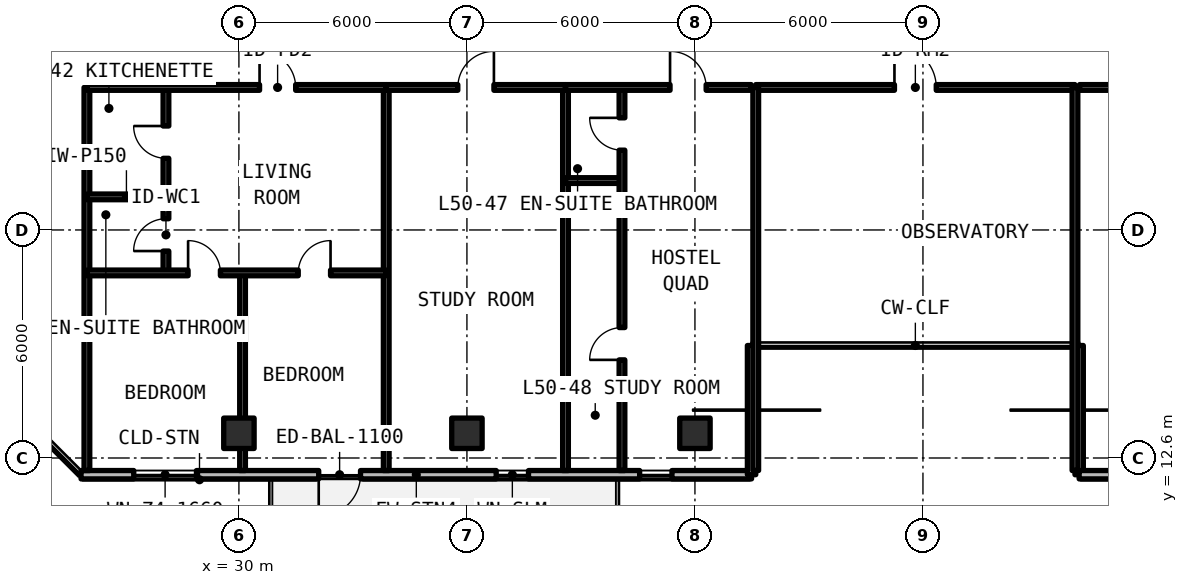
"""IFC4 building model, lengths in metres.
Left out: names, types, materials, properties, quantities, classifications, styles, units other than length and angle.
Written with IfcOpenShell. Run it as: python <this file> out.ifc"""

import sys

from ifc_helpers import new_model, si_unit, direction, frame, frame_2d, origin, origin_2d, place, context, subcontext, project, spatial, rectangle, extrude, element, fill, save


model = new_model("IFC4")
c1 = context("Model", 3, precision=1e-05, world=origin(), true_north=direction((0.0, 1.0)))
c2 = subcontext(c1, "Body", "Model", "MODEL_VIEW")
j1 = project(units=[si_unit("LENGTHUNIT", "METRE"), si_unit("PLANEANGLEUNIT", "RADIAN")], contexts=[c1])
p1 = place(None, origin())
s1 = spatial("IfcSite", under=j1, at=p1, CompositionType="ELEMENT")
p2 = place(p1, origin())
s2 = spatial("IfcBuilding", under=s1, at=p2, CompositionType="ELEMENT")
p3 = place(p2, frame((0.0, 0.0, 181.83)))
s3 = spatial("IfcBuildingStorey", under=s2, at=p3, CompositionType="ELEMENT", Elevation=181.83)
for number, where, z_axis, x_axis in (
    (1, (30.0, 13.25, 0.0), (0.0, 0.0, 1.0), (1.0, 0.0, 0.0)),
    (2, (36.0, 13.25, 0.0), (0.0, 0.0, 1.0), (1.0, 0.0, 0.0)),
    (3, (42.0, 13.25, 0.0), (0.0, 0.0, 1.0), (1.0, 0.0, 0.0)),
):
    element("IfcColumn", number, at=place(p3, frame(where, z_axis=z_axis, x_axis=x_axis)), inside=s3, PredefinedType="COLUMN", context=c2, shape_type="SweptSolid", body=[
        extrude(rectangle(XDim=0.8, YDim=0.8, at=origin_2d()), origin(), (0.0, 0.0, 1.0), 3.3),
    ])
p4 = place(p3, frame((25.846, 12.16, 0.0), z_axis=(0.0, 0.0, 1.0), x_axis=(1.0, 0.0, 0.0)))
e4 = element("IfcWall", 4, at=p4, inside=s3, PredefinedType="SOLIDWALL", context=c2, shape_type="SweptSolid", body=[
    extrude(rectangle(XDim=17.644, YDim=0.22, at=frame_2d((8.822, 0.0))), origin(), (0.0, 0.0, 1.0), 3.08),
])
p5 = place(p4, frame((6.254, 0.0, 0.0)))
e5 = element("IfcOpeningElement", 5, at=p5, cuts=e4, PredefinedType="OPENING", context=c2, shape_type="SweptSolid", body=[
    extrude(rectangle(XDim=1.1, YDim=2.15, at=frame_2d((0.55, 1.075))), frame((0.0, 0.12, 0.0), z_axis=(0.0, -1.0, 0.0), x_axis=(1.0, 0.0, 0.0)), (0.0, 0.0, 1.0), 0.24),
])
p6 = place(p4, frame((1.387, 0.0, 0.78)))
e6 = element("IfcOpeningElement", 6, at=p6, cuts=e4, PredefinedType="OPENING", context=c2, shape_type="SweptSolid", body=[
    extrude(rectangle(XDim=1.65, YDim=1.66, at=frame_2d((0.825, 0.83))), frame((0.0, 0.12, 0.0), z_axis=(0.0, -1.0, 0.0), x_axis=(1.0, 0.0, 0.0)), (0.0, 0.0, 1.0), 0.24),
])
p7 = place(p4, frame((10.925, 0.0, 0.78)))
e7 = element("IfcOpeningElement", 7, at=p7, cuts=e4, PredefinedType="OPENING", context=c2, shape_type="SweptSolid", body=[
    extrude(rectangle(XDim=0.85, YDim=1.65, at=frame_2d((0.425, 0.825))), frame((0.0, 0.12, 0.0), z_axis=(0.0, -1.0, 0.0), x_axis=(1.0, 0.0, 0.0)), (0.0, 0.0, 1.0), 0.24),
])
p8 = place(p4, frame((14.699, 0.0, 0.78)))
e8 = element("IfcOpeningElement", 8, at=p8, cuts=e4, PredefinedType="OPENING", context=c2, shape_type="SweptSolid", body=[
    extrude(rectangle(XDim=0.85, YDim=1.65, at=frame_2d((0.425, 0.825))), frame((0.0, 0.12, 0.0), z_axis=(0.0, -1.0, 0.0), x_axis=(1.0, 0.0, 0.0)), (0.0, 0.0, 1.0), 0.24),
])
for number, where, z_axis, x_axis in (
    (9, (43.49, 12.16, 0.0), (0.0, 0.0, 1.0), (0.0, 1.0, 0.0)),
    (10, (52.11, 15.56, 0.0), (0.0, 0.0, 1.0), (0.0, -1.0, 0.0)),
):
    element("IfcWall", number, at=place(p3, frame(where, z_axis=z_axis, x_axis=x_axis)), inside=s3, PredefinedType="SOLIDWALL", context=c2, shape_type="SweptSolid", body=[
        extrude(rectangle(XDim=3.4, YDim=0.22, at=frame_2d((1.7, 0.0))), origin(), (0.0, 0.0, 1.0), 3.08),
    ])
p9 = place(p3, frame((52.11, 12.16, 0.0), z_axis=(0.0, 0.0, 1.0), x_axis=(1.0, 0.0, 0.0)))
e11 = element("IfcWall", 11, at=p9, inside=s3, PredefinedType="SOLIDWALL", context=c2, shape_type="SweptSolid", body=[
    extrude(rectangle(XDim=43.244, YDim=0.22, at=frame_2d((21.622, 0.0))), origin(), (0.0, 0.0, 1.0), 3.08),
])
p10 = place(p9, frame((4.19, 0.0, 0.0)))
e12 = element("IfcOpeningElement", 12, at=p10, cuts=e11, PredefinedType="OPENING", context=c2, shape_type="SweptSolid", body=[
    extrude(rectangle(XDim=1.1, YDim=2.15, at=frame_2d((0.55, 1.075))), frame((0.0, 0.12, 0.0), z_axis=(0.0, -1.0, 0.0), x_axis=(1.0, 0.0, 0.0)), (0.0, 0.0, 1.0), 0.24),
])
p11 = place(p9, frame((17.54, 0.0, 0.0)))
e13 = element("IfcOpeningElement", 13, at=p11, cuts=e11, PredefinedType="OPENING", context=c2, shape_type="SweptSolid", body=[
    extrude(rectangle(XDim=1.1, YDim=2.15, at=frame_2d((0.55, 1.075))), frame((0.0, 0.12, 0.0), z_axis=(0.0, -1.0, 0.0), x_axis=(1.0, 0.0, 0.0)), (0.0, 0.0, 1.0), 0.24),
])
p12 = place(p9, frame((28.89, 0.0, 0.0)))
e14 = element("IfcOpeningElement", 14, at=p12, cuts=e11, PredefinedType="OPENING", context=c2, shape_type="SweptSolid", body=[
    extrude(rectangle(XDim=1.1, YDim=2.15, at=frame_2d((0.55, 1.075))), frame((0.0, 0.12, 0.0), z_axis=(0.0, -1.0, 0.0), x_axis=(1.0, 0.0, 0.0)), (0.0, 0.0, 1.0), 0.24),
])
p13 = place(p9, frame((8.66, 0.0, 0.78)))
e15 = element("IfcOpeningElement", 15, at=p13, cuts=e11, PredefinedType="OPENING", context=c2, shape_type="SweptSolid", body=[
    extrude(rectangle(XDim=1.65, YDim=1.66, at=frame_2d((0.825, 0.83))), frame((0.0, 0.12, 0.0), z_axis=(0.0, -1.0, 0.0), x_axis=(1.0, 0.0, 0.0)), (0.0, 0.0, 1.0), 0.24),
])
p14 = place(p9, frame((14.759, 0.0, 0.78)))
e16 = element("IfcOpeningElement", 16, at=p14, cuts=e11, PredefinedType="OPENING", context=c2, shape_type="SweptSolid", body=[
    extrude(rectangle(XDim=1.65, YDim=1.66, at=frame_2d((0.825, 0.83))), frame((0.0, 0.12, 0.0), z_axis=(0.0, -1.0, 0.0), x_axis=(1.0, 0.0, 0.0)), (0.0, 0.0, 1.0), 0.24),
])
p15 = place(p9, frame((32.902, 0.0, 0.78)))
e17 = element("IfcOpeningElement", 17, at=p15, cuts=e11, PredefinedType="OPENING", context=c2, shape_type="SweptSolid", body=[
    extrude(rectangle(XDim=1.65, YDim=1.66, at=frame_2d((0.825, 0.83))), frame((0.0, 0.12, 0.0), z_axis=(0.0, -1.0, 0.0), x_axis=(1.0, 0.0, 0.0)), (0.0, 0.0, 1.0), 0.24),
])
p16 = place(p9, frame((38.313, 0.0, 0.78)))
e18 = element("IfcOpeningElement", 18, at=p16, cuts=e11, PredefinedType="OPENING", context=c2, shape_type="SweptSolid", body=[
    extrude(rectangle(XDim=0.85, YDim=1.65, at=frame_2d((0.425, 0.825))), frame((0.0, 0.12, 0.0), z_axis=(0.0, -1.0, 0.0), x_axis=(1.0, 0.0, 0.0)), (0.0, 0.0, 1.0), 0.24),
])
p17 = place(p9, frame((40.615, 0.0, 0.78)))
e19 = element("IfcOpeningElement", 19, at=p17, cuts=e11, PredefinedType="OPENING", context=c2, shape_type="SweptSolid", body=[
    extrude(rectangle(XDim=1.65, YDim=1.66, at=frame_2d((0.825, 0.83))), frame((0.0, 0.12, 0.0), z_axis=(0.0, -1.0, 0.0), x_axis=(1.0, 0.0, 0.0)), (0.0, 0.0, 1.0), 0.24),
])
p18 = place(p3, frame((43.6, 22.35, 0.0), z_axis=(0.0, 0.0, 1.0), x_axis=(1.0, 0.0, 0.0)))
e20 = element("IfcWall", 20, at=p18, inside=s3, PredefinedType="SOLIDWALL", context=c2, shape_type="SweptSolid", body=[
    extrude(rectangle(XDim=8.4, YDim=0.15, at=frame_2d((4.2, 0.0))), origin(), (0.0, 0.0, 1.0), 2.35),
])
p19 = place(p18, frame((3.65, 0.0, 0.0)))
e21 = element("IfcOpeningElement", 21, at=p19, cuts=e20, PredefinedType="OPENING", context=c2, shape_type="SweptSolid", body=[
    extrude(rectangle(XDim=1.1, YDim=2.15, at=frame_2d((0.55, 1.075))), frame((0.0, 0.085, 0.0), z_axis=(0.0, -1.0, 0.0), x_axis=(1.0, 0.0, 0.0)), (0.0, 0.0, 1.0), 0.17),
])
for number, where, z_axis, x_axis in (
    (22, (43.6, 12.27, 0.0), (0.0, 0.0, 1.0), (0.0, 1.0, 0.0)),
    (23, (52.0, 12.27, 0.0), (0.0, 0.0, 1.0), (0.0, 1.0, 0.0)),
    (24, (26.0, 12.27, 0.0), (0.0, 0.0, 1.0), (0.0, 1.0, 0.0)),
    (25, (33.876, 12.27, 0.0), (0.0, 0.0, 1.0), (0.0, 1.0, 0.0)),
):
    element("IfcWall", number, at=place(p3, frame(where, z_axis=z_axis, x_axis=x_axis)), inside=s3, PredefinedType="SOLIDWALL", context=c2, shape_type="SweptSolid", body=[
        extrude(rectangle(XDim=10.08, YDim=0.15, at=frame_2d((5.04, 0.0))), origin(), (0.0, 0.0, 1.0), 2.35),
    ])
p20 = place(p3, frame((26.0, 19.471, 0.0), z_axis=(0.0, 0.0, 1.0), x_axis=(1.0, 0.0, 0.0)))
e26 = element("IfcWall", 26, at=p20, inside=s3, PredefinedType="PARTITIONING", context=c2, shape_type="SweptSolid", body=[
    extrude(rectangle(XDim=2.08, YDim=0.15, at=frame_2d((1.04, 0.0))), origin(), (0.0, 0.0, 1.0), 2.35),
])
p21 = place(p3, frame((28.08, 17.47, 0.0), z_axis=(0.0, 0.0, 1.0), x_axis=(0.0, 1.0, 0.0)))
e27 = element("IfcWall", 27, at=p21, inside=s3, PredefinedType="PARTITIONING", context=c2, shape_type="SweptSolid", body=[
    extrude(rectangle(XDim=4.88, YDim=0.15, at=frame_2d((2.44, 0.0))), origin(), (0.0, 0.0, 1.0), 2.35),
])
p22 = place(p21, frame((0.575, 0.0, 0.0)))
e28 = element("IfcOpeningElement", 28, at=p22, cuts=e27, PredefinedType="OPENING", context=c2, shape_type="SweptSolid", body=[
    extrude(rectangle(XDim=0.85, YDim=2.1, at=frame_2d((0.425, 1.05))), frame((0.0, 0.085, 0.0), z_axis=(0.0, -1.0, 0.0), x_axis=(1.0, 0.0, 0.0)), (0.0, 0.0, 1.0), 0.17),
])
p23 = place(p21, frame((3.015, 0.0, 0.0)))
e29 = element("IfcOpeningElement", 29, at=p23, cuts=e27, PredefinedType="OPENING", context=c2, shape_type="SweptSolid", body=[
    extrude(rectangle(XDim=0.85, YDim=2.1, at=frame_2d((0.425, 1.05))), frame((0.0, 0.085, 0.0), z_axis=(0.0, -1.0, 0.0), x_axis=(1.0, 0.0, 0.0)), (0.0, 0.0, 1.0), 0.17),
])
p24 = place(p3, frame((30.096, 12.27, 0.0), z_axis=(0.0, 0.0, 1.0), x_axis=(0.0, 1.0, 0.0)))
e30 = element("IfcWall", 30, at=p24, inside=s3, PredefinedType="PARTITIONING", context=c2, shape_type="SweptSolid", body=[
    extrude(rectangle(XDim=5.2, YDim=0.15, at=frame_2d((2.6, 0.0))), origin(), (0.0, 0.0, 1.0), 2.35),
])
p25 = place(p3, frame((26.0, 17.47, 0.0), z_axis=(0.0, 0.0, 1.0), x_axis=(1.0, 0.0, 0.0)))
e31 = element("IfcWall", 31, at=p25, inside=s3, PredefinedType="PARTITIONING", context=c2, shape_type="SweptSolid", body=[
    extrude(rectangle(XDim=7.876, YDim=0.15, at=frame_2d((3.938, 0.0))), origin(), (0.0, 0.0, 1.0), 2.35),
])
p26 = place(p25, frame((2.663, 0.0, 0.0)))
e32 = element("IfcOpeningElement", 32, at=p26, cuts=e31, PredefinedType="OPENING", context=c2, shape_type="SweptSolid", body=[
    extrude(rectangle(XDim=0.85, YDim=2.1, at=frame_2d((0.425, 1.05))), frame((0.0, 0.085, 0.0), z_axis=(0.0, -1.0, 0.0), x_axis=(1.0, 0.0, 0.0)), (0.0, 0.0, 1.0), 0.17),
])
p27 = place(p25, frame((5.561, 0.0, 0.0)))
e33 = element("IfcOpeningElement", 33, at=p27, cuts=e31, PredefinedType="OPENING", context=c2, shape_type="SweptSolid", body=[
    extrude(rectangle(XDim=0.85, YDim=2.1, at=frame_2d((0.425, 1.05))), frame((0.0, 0.085, 0.0), z_axis=(0.0, -1.0, 0.0), x_axis=(1.0, 0.0, 0.0)), (0.0, 0.0, 1.0), 0.17),
])
p28 = place(p3, frame((26.0, 22.35, 0.0), z_axis=(0.0, 0.0, 1.0), x_axis=(1.0, 0.0, 0.0)))
e34 = element("IfcWall", 34, at=p28, inside=s3, PredefinedType="SOLIDWALL", context=c2, shape_type="SweptSolid", body=[
    extrude(rectangle(XDim=7.876, YDim=0.15, at=frame_2d((3.938, 0.0))), origin(), (0.0, 0.0, 1.0), 2.35),
])
p29 = place(p28, frame((4.543, 0.0, 0.0)))
e35 = element("IfcOpeningElement", 35, at=p29, cuts=e34, PredefinedType="OPENING", context=c2, shape_type="SweptSolid", body=[
    extrude(rectangle(XDim=0.95, YDim=2.15, at=frame_2d((0.475, 1.075))), frame((0.0, 0.085, 0.0), z_axis=(0.0, -1.0, 0.0), x_axis=(1.0, 0.0, 0.0)), (0.0, 0.0, 1.0), 0.17),
])
p30 = place(p3, frame((38.594, 12.27, 0.0), z_axis=(0.0, 0.0, 1.0), x_axis=(0.0, 1.0, 0.0)))
e36 = element("IfcWall", 36, at=p30, inside=s3, PredefinedType="SOLIDWALL", context=c2, shape_type="SweptSolid", body=[
    extrude(rectangle(XDim=10.08, YDim=0.15, at=frame_2d((5.04, 0.0))), origin(), (0.0, 0.0, 1.0), 2.35),
])
p31 = place(p3, frame((33.876, 22.35, 0.0), z_axis=(0.0, 0.0, 1.0), x_axis=(1.0, 0.0, 0.0)))
e37 = element("IfcWall", 37, at=p31, inside=s3, PredefinedType="SOLIDWALL", context=c2, shape_type="SweptSolid", body=[
    extrude(rectangle(XDim=4.718, YDim=0.15, at=frame_2d((2.359, 0.0))), origin(), (0.0, 0.0, 1.0), 2.35),
])
p32 = place(p31, frame((1.884, 0.0, 0.0)))
e38 = element("IfcOpeningElement", 38, at=p32, cuts=e37, PredefinedType="OPENING", context=c2, shape_type="SweptSolid", body=[
    extrude(rectangle(XDim=0.95, YDim=2.15, at=frame_2d((0.475, 1.075))), frame((0.0, 0.085, 0.0), z_axis=(0.0, -1.0, 0.0), x_axis=(1.0, 0.0, 0.0)), (0.0, 0.0, 1.0), 0.17),
])
p33 = place(p3, frame((38.594, 19.9, 0.0), z_axis=(0.0, 0.0, 1.0), x_axis=(1.0, 0.0, 0.0)))
e39 = element("IfcWall", 39, at=p33, inside=s3, PredefinedType="PARTITIONING", context=c2, shape_type="SweptSolid", body=[
    extrude(rectangle(XDim=1.486, YDim=0.15, at=frame_2d((0.743, 0.0))), origin(), (0.0, 0.0, 1.0), 2.35),
])
p34 = place(p3, frame((40.08, 12.27, 0.0), z_axis=(0.0, 0.0, 1.0), x_axis=(0.0, 1.0, 0.0)))
e40 = element("IfcWall", 40, at=p34, inside=s3, PredefinedType="PARTITIONING", context=c2, shape_type="SweptSolid", body=[
    extrude(rectangle(XDim=10.08, YDim=0.15, at=frame_2d((5.04, 0.0))), origin(), (0.0, 0.0, 1.0), 2.35),
])
p35 = place(p34, frame((2.912, 0.0, 0.0)))
e41 = element("IfcOpeningElement", 41, at=p35, cuts=e40, PredefinedType="OPENING", context=c2, shape_type="SweptSolid", body=[
    extrude(rectangle(XDim=0.85, YDim=2.1, at=frame_2d((0.425, 1.05))), frame((0.0, 0.085, 0.0), z_axis=(0.0, -1.0, 0.0), x_axis=(1.0, 0.0, 0.0)), (0.0, 0.0, 1.0), 0.17),
])
p36 = place(p34, frame((8.43, 0.0, 0.0)))
e42 = element("IfcOpeningElement", 42, at=p36, cuts=e40, PredefinedType="OPENING", context=c2, shape_type="SweptSolid", body=[
    extrude(rectangle(XDim=0.85, YDim=2.1, at=frame_2d((0.425, 1.05))), frame((0.0, 0.085, 0.0), z_axis=(0.0, -1.0, 0.0), x_axis=(1.0, 0.0, 0.0)), (0.0, 0.0, 1.0), 0.17),
])
p37 = place(p3, frame((38.594, 22.35, 0.0), z_axis=(0.0, 0.0, 1.0), x_axis=(1.0, 0.0, 0.0)))
e43 = element("IfcWall", 43, at=p37, inside=s3, PredefinedType="SOLIDWALL", context=c2, shape_type="SweptSolid", body=[
    extrude(rectangle(XDim=4.886, YDim=0.15, at=frame_2d((2.443, 0.0))), origin(), (0.0, 0.0, 1.0), 2.35),
])
p38 = place(p37, frame((2.751, 0.0, 0.0)))
e44 = element("IfcOpeningElement", 44, at=p38, cuts=e43, PredefinedType="OPENING", context=c2, shape_type="SweptSolid", body=[
    extrude(rectangle(XDim=0.95, YDim=2.15, at=frame_2d((0.475, 1.075))), frame((0.0, 0.085, 0.0), z_axis=(0.0, -1.0, 0.0), x_axis=(1.0, 0.0, 0.0)), (0.0, 0.0, 1.0), 0.17),
])
p39 = place(p3, frame((52.12, 22.35, 0.0), z_axis=(0.0, 0.0, 1.0), x_axis=(1.0, 0.0, 0.0)))
e45 = element("IfcWall", 45, at=p39, inside=s3, PredefinedType="SOLIDWALL", context=c2, shape_type="SweptSolid", body=[
    extrude(rectangle(XDim=5.976, YDim=0.15, at=frame_2d((2.988, 0.0))), origin(), (0.0, 0.0, 1.0), 2.35),
])
p40 = place(p39, frame((2.513, 0.0, 0.0)))
e46 = element("IfcOpeningElement", 46, at=p40, cuts=e45, PredefinedType="OPENING", context=c2, shape_type="SweptSolid", body=[
    extrude(rectangle(XDim=0.95, YDim=2.15, at=frame_2d((0.475, 1.075))), frame((0.0, 0.085, 0.0), z_axis=(0.0, -1.0, 0.0), x_axis=(1.0, 0.0, 0.0)), (0.0, 0.0, 1.0), 0.17),
])
p41 = place(p5, frame((1.1, 0.0, 0.0), z_axis=(0.0, 0.0, 1.0), x_axis=(-1.0, 0.0, 0.0)))
e47 = element("IfcDoor", 47, at=p41, inside=s3, OperationType="SINGLE_SWING_LEFT", PredefinedType="DOOR", context=c2, shape_type="SweptSolid", body=[
    extrude(rectangle(XDim=1.1, YDim=2.15, at=frame_2d((0.55, 1.075))), frame((0.0, 0.025, 0.0), z_axis=(0.0, -1.0, 0.0), x_axis=(1.0, 0.0, 0.0)), (0.0, 0.0, 1.0), 0.05),
])
fill(e5, e47)
p42 = place(p6, origin())
e48 = element("IfcWindow", 48, at=p42, inside=s3, PartitioningType="SINGLE_PANEL", PredefinedType="WINDOW", context=c2, shape_type="SweptSolid", body=[
    extrude(rectangle(XDim=1.65, YDim=1.66, at=frame_2d((0.825, 0.83))), frame((0.0, 0.03, 0.0), z_axis=(0.0, -1.0, 0.0), x_axis=(1.0, 0.0, 0.0)), (0.0, 0.0, 1.0), 0.06),
])
fill(e6, e48)
p43 = place(p7, origin())
e49 = element("IfcWindow", 49, at=p43, inside=s3, PartitioningType="SINGLE_PANEL", PredefinedType="WINDOW", context=c2, shape_type="SweptSolid", body=[
    extrude(rectangle(XDim=0.85, YDim=1.65, at=frame_2d((0.425, 0.825))), frame((0.0, 0.03, 0.0), z_axis=(0.0, -1.0, 0.0), x_axis=(1.0, 0.0, 0.0)), (0.0, 0.0, 1.0), 0.06),
])
fill(e7, e49)
p44 = place(p8, origin())
e50 = element("IfcWindow", 50, at=p44, inside=s3, PartitioningType="SINGLE_PANEL", PredefinedType="WINDOW", context=c2, shape_type="SweptSolid", body=[
    extrude(rectangle(XDim=0.85, YDim=1.65, at=frame_2d((0.425, 0.825))), frame((0.0, 0.03, 0.0), z_axis=(0.0, -1.0, 0.0), x_axis=(1.0, 0.0, 0.0)), (0.0, 0.0, 1.0), 0.06),
])
fill(e8, e50)
p45 = place(p19, origin())
e51 = element("IfcDoor", 51, at=p45, inside=s3, OperationType="SINGLE_SWING_LEFT", PredefinedType="DOOR", context=c2, shape_type="SweptSolid", body=[
    extrude(rectangle(XDim=1.1, YDim=2.15, at=frame_2d((0.55, 1.075))), frame((0.0, 0.025, 0.0), z_axis=(0.0, -1.0, 0.0), x_axis=(1.0, 0.0, 0.0)), (0.0, 0.0, 1.0), 0.05),
])
fill(e21, e51)
p46 = place(p22, origin())
e52 = element("IfcDoor", 52, at=p46, inside=s3, OperationType="SINGLE_SWING_LEFT", PredefinedType="DOOR", context=c2, shape_type="SweptSolid", body=[
    extrude(rectangle(XDim=0.85, YDim=2.1, at=frame_2d((0.425, 1.05))), frame((0.0, 0.025, 0.0), z_axis=(0.0, -1.0, 0.0), x_axis=(1.0, 0.0, 0.0)), (0.0, 0.0, 1.0), 0.05),
])
fill(e28, e52)
p47 = place(p23, origin())
e53 = element("IfcDoor", 53, at=p47, inside=s3, OperationType="SINGLE_SWING_RIGHT", PredefinedType="DOOR", context=c2, shape_type="SweptSolid", body=[
    extrude(rectangle(XDim=0.85, YDim=2.1, at=frame_2d((0.425, 1.05))), frame((0.0, 0.025, 0.0), z_axis=(0.0, -1.0, 0.0), x_axis=(1.0, 0.0, 0.0)), (0.0, 0.0, 1.0), 0.05),
])
fill(e29, e53)
p48 = place(p26, origin())
e54 = element("IfcDoor", 54, at=p48, inside=s3, OperationType="SINGLE_SWING_LEFT", PredefinedType="DOOR", context=c2, shape_type="SweptSolid", body=[
    extrude(rectangle(XDim=0.85, YDim=2.1, at=frame_2d((0.425, 1.05))), frame((0.0, 0.025, 0.0), z_axis=(0.0, -1.0, 0.0), x_axis=(1.0, 0.0, 0.0)), (0.0, 0.0, 1.0), 0.05),
])
fill(e32, e54)
p49 = place(p27, origin())
e55 = element("IfcDoor", 55, at=p49, inside=s3, OperationType="SINGLE_SWING_RIGHT", PredefinedType="DOOR", context=c2, shape_type="SweptSolid", body=[
    extrude(rectangle(XDim=0.85, YDim=2.1, at=frame_2d((0.425, 1.05))), frame((0.0, 0.025, 0.0), z_axis=(0.0, -1.0, 0.0), x_axis=(1.0, 0.0, 0.0)), (0.0, 0.0, 1.0), 0.05),
])
fill(e33, e55)
p50 = place(p29, origin())
e56 = element("IfcDoor", 56, at=p50, inside=s3, OperationType="SINGLE_SWING_LEFT", PredefinedType="DOOR", context=c2, shape_type="SweptSolid", body=[
    extrude(rectangle(XDim=0.95, YDim=2.15, at=frame_2d((0.475, 1.075))), frame((0.0, 0.025, 0.0), z_axis=(0.0, -1.0, 0.0), x_axis=(1.0, 0.0, 0.0)), (0.0, 0.0, 1.0), 0.05),
])
fill(e35, e56)
p51 = place(p32, origin())
e57 = element("IfcDoor", 57, at=p51, inside=s3, OperationType="SINGLE_SWING_RIGHT", PredefinedType="DOOR", context=c2, shape_type="SweptSolid", body=[
    extrude(rectangle(XDim=0.95, YDim=2.15, at=frame_2d((0.475, 1.075))), frame((0.0, 0.025, 0.0), z_axis=(0.0, -1.0, 0.0), x_axis=(1.0, 0.0, 0.0)), (0.0, 0.0, 1.0), 0.05),
])
fill(e38, e57)
p52 = place(p35, origin())
e58 = element("IfcDoor", 58, at=p52, inside=s3, OperationType="SINGLE_SWING_LEFT", PredefinedType="DOOR", context=c2, shape_type="SweptSolid", body=[
    extrude(rectangle(XDim=0.85, YDim=2.1, at=frame_2d((0.425, 1.05))), frame((0.0, 0.025, 0.0), z_axis=(0.0, -1.0, 0.0), x_axis=(1.0, 0.0, 0.0)), (0.0, 0.0, 1.0), 0.05),
])
fill(e41, e58)
p53 = place(p36, origin())
e59 = element("IfcDoor", 59, at=p53, inside=s3, OperationType="SINGLE_SWING_RIGHT", PredefinedType="DOOR", context=c2, shape_type="SweptSolid", body=[
    extrude(rectangle(XDim=0.85, YDim=2.1, at=frame_2d((0.425, 1.05))), frame((0.0, 0.025, 0.0), z_axis=(0.0, -1.0, 0.0), x_axis=(1.0, 0.0, 0.0)), (0.0, 0.0, 1.0), 0.05),
])
fill(e42, e59)
p54 = place(p38, origin())
e60 = element("IfcDoor", 60, at=p54, inside=s3, OperationType="SINGLE_SWING_LEFT", PredefinedType="DOOR", context=c2, shape_type="SweptSolid", body=[
    extrude(rectangle(XDim=0.95, YDim=2.15, at=frame_2d((0.475, 1.075))), frame((0.0, 0.025, 0.0), z_axis=(0.0, -1.0, 0.0), x_axis=(1.0, 0.0, 0.0)), (0.0, 0.0, 1.0), 0.05),
])
fill(e44, e60)
save(model, sys.argv[1])
